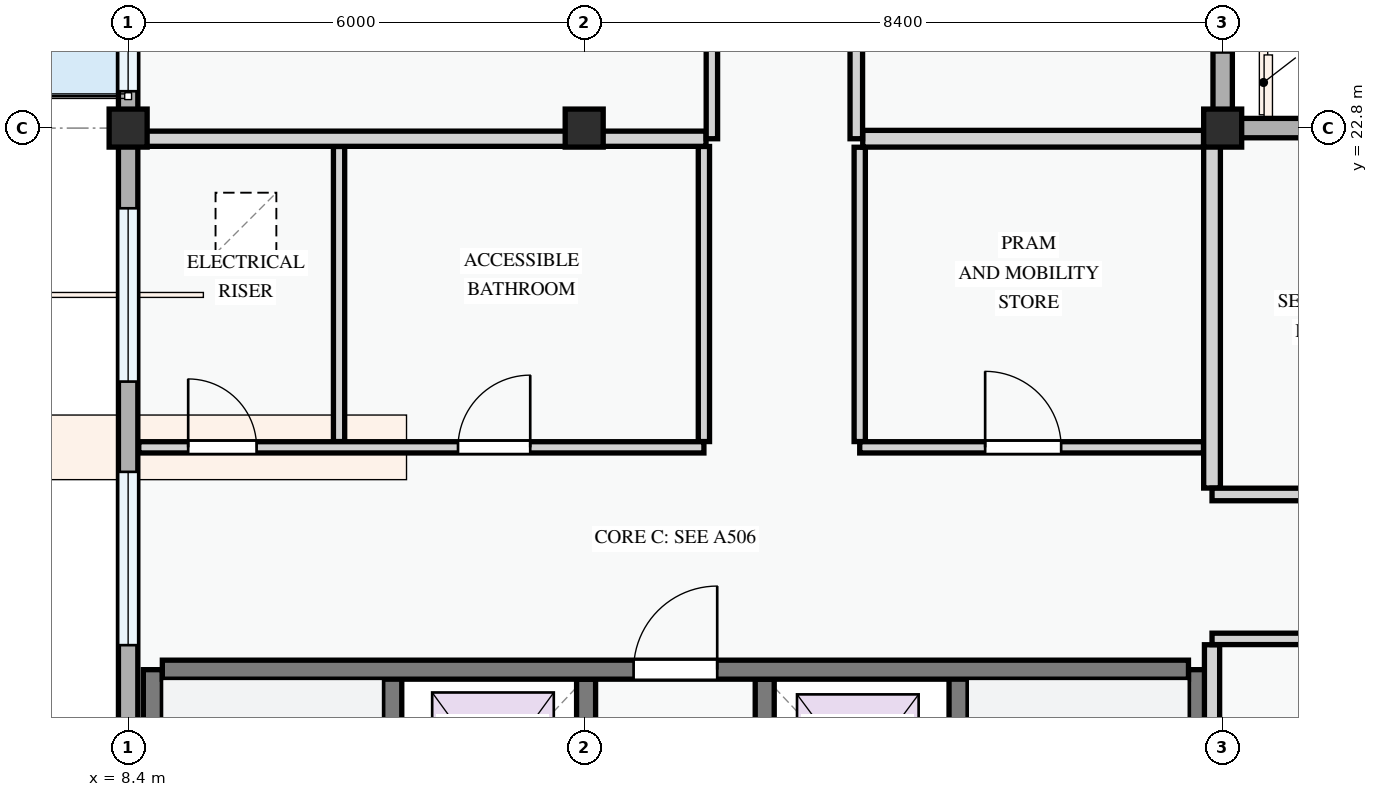
"""IFC4 building model, lengths in metres.
Left out: names, types, materials, properties, quantities, classifications, styles, units other than length and angle.
Written with IfcOpenShell. Run it as: python <this file> out.ifc"""

import sys

from ifc_helpers import new_model, si_unit, direction, frame, frame_2d, origin, origin_2d, place, context, subcontext, project, spatial, rectangle, extrude, element, fill, save


model = new_model("IFC4")
c1 = context("Model", 3, precision=1e-05, world=origin(), true_north=direction((0.0, 1.0)))
c2 = subcontext(c1, "Body", "Model", "MODEL_VIEW")
j1 = project(units=[si_unit("LENGTHUNIT", "METRE"), si_unit("PLANEANGLEUNIT", "RADIAN")], contexts=[c1])
p1 = place(None, origin())
s1 = spatial("IfcSite", under=j1, at=p1, CompositionType="ELEMENT")
p2 = place(p1, origin())
s2 = spatial("IfcBuilding", under=s1, at=p2, CompositionType="ELEMENT")
p3 = place(p2, frame((0.0, 0.0, 31.2)))
s3 = spatial("IfcBuildingStorey", under=s2, at=p3, CompositionType="ELEMENT", Elevation=31.2)
for number, where, z_axis, x_axis in (
    (1, (8.4, 22.8, 0.0), (0.0, 0.0, 1.0), (1.0, 0.0, 0.0)),
    (2, (14.4, 22.8, 0.0), (0.0, 0.0, 1.0), (1.0, 0.0, 0.0)),
    (3, (22.8, 22.8, 0.0), (0.0, 0.0, 1.0), (1.0, 0.0, 0.0)),
):
    element("IfcColumn", number, at=place(p3, frame(where, z_axis=z_axis, x_axis=x_axis)), inside=s3, PredefinedType="COLUMN", context=c2, shape_type="SweptSolid", body=[
        extrude(rectangle(XDim=0.5, YDim=0.5, at=origin_2d()), origin(), (0.0, 0.0, 1.0), 3.3),
    ])
p4 = place(p3, frame((22.8, 22.8, 0.0), z_axis=(0.0, 0.0, 1.0), x_axis=(0.0, 1.0, 0.0)))
e4 = element("IfcWall", 4, at=p4, inside=s3, PredefinedType="STANDARD", context=c2, shape_type="SweptSolid", body=[
    extrude(rectangle(XDim=6.0, YDim=0.255, at=frame_2d((3.0, 0.0))), origin(), (0.0, 0.0, 1.0), 2.575),
])
p5 = place(p4, frame((0.995, 0.0, 0.78)))
e5 = element("IfcOpeningElement", 5, at=p5, cuts=e4, PredefinedType="OPENING", context=c2, shape_type="SweptSolid", body=[
    extrude(rectangle(XDim=1.88, YDim=1.52, at=frame_2d((0.94, 0.76))), frame((0.0, 0.137, 0.0), z_axis=(0.0, -1.0, 0.0), x_axis=(1.0, 0.0, 0.0)), (0.0, 0.0, 1.0), 0.275),
])
p6 = place(p4, frame((4.17, 0.0, 0.78)))
e6 = element("IfcOpeningElement", 6, at=p6, cuts=e4, PredefinedType="OPENING", context=c2, shape_type="SweptSolid", body=[
    extrude(rectangle(XDim=1.15, YDim=1.25, at=frame_2d((0.575, 0.625))), frame((0.0, 0.137, 0.0), z_axis=(0.0, -1.0, 0.0), x_axis=(1.0, 0.0, 0.0)), (0.0, 0.0, 1.0), 0.275),
])
p7 = place(p3, frame((8.4, 28.8, 0.0), z_axis=(0.0, 0.0, 1.0), x_axis=(0.0, -1.0, 0.0)))
e7 = element("IfcWall", 7, at=p7, inside=s3, PredefinedType="STANDARD", context=c2, shape_type="SweptSolid", body=[
    extrude(rectangle(XDim=6.0, YDim=0.255, at=frame_2d((3.0, 0.0))), origin(), (0.0, 0.0, 1.0), 2.575),
])
p8 = place(p7, frame((2.49, 0.0, 0.0)))
e8 = element("IfcOpeningElement", 8, at=p8, cuts=e7, PredefinedType="OPENING", context=c2, shape_type="SweptSolid", body=[
    extrude(rectangle(XDim=1.2, YDim=2.15, at=frame_2d((0.6, 1.075))), frame((0.0, 0.137, 0.0), z_axis=(0.0, -1.0, 0.0), x_axis=(1.0, 0.0, 0.0)), (0.0, 0.0, 1.0), 0.275),
])
p9 = place(p7, frame((0.575, 0.0, 0.78)))
e9 = element("IfcOpeningElement", 9, at=p9, cuts=e7, PredefinedType="OPENING", context=c2, shape_type="SweptSolid", body=[
    extrude(rectangle(XDim=1.2, YDim=1.35, at=frame_2d((0.6, 0.675))), frame((0.0, 0.137, 0.0), z_axis=(0.0, -1.0, 0.0), x_axis=(1.0, 0.0, 0.0)), (0.0, 0.0, 1.0), 0.275),
])
p10 = place(p7, frame((4.035, 0.0, 0.78)))
e10 = element("IfcOpeningElement", 10, at=p10, cuts=e7, PredefinedType="OPENING", context=c2, shape_type="SweptSolid", body=[
    extrude(rectangle(XDim=1.48, YDim=1.52, at=frame_2d((0.74, 0.76))), frame((0.0, 0.137, 0.0), z_axis=(0.0, -1.0, 0.0), x_axis=(1.0, 0.0, 0.0)), (0.0, 0.0, 1.0), 0.275),
])
p11 = place(p3, frame((8.4, 22.8, 0.0), z_axis=(0.0, 0.0, 1.0), x_axis=(0.0, -1.0, 0.0)))
e11 = element("IfcWall", 11, at=p11, inside=s3, PredefinedType="STANDARD", context=c2, shape_type="SweptSolid", body=[
    extrude(rectangle(XDim=8.4, YDim=0.255, at=frame_2d((4.2, 0.0))), origin(), (0.0, 0.0, 1.0), 2.425),
])
p12 = place(p11, frame((1.055, 0.0, 0.78)))
e12 = element("IfcOpeningElement", 12, at=p12, cuts=e11, PredefinedType="OPENING", context=c2, shape_type="SweptSolid", body=[
    extrude(rectangle(XDim=2.28, YDim=1.46, at=frame_2d((1.14, 0.73))), frame((0.0, 0.137, 0.0), z_axis=(0.0, -1.0, 0.0), x_axis=(1.0, 0.0, 0.0)), (0.0, 0.0, 1.0), 0.275),
])
p13 = place(p11, frame((4.522, 0.0, 0.78)))
e13 = element("IfcOpeningElement", 13, at=p13, cuts=e11, PredefinedType="OPENING", context=c2, shape_type="SweptSolid", body=[
    extrude(rectangle(XDim=2.28, YDim=1.46, at=frame_2d((1.14, 0.73))), frame((0.0, 0.137, 0.0), z_axis=(0.0, -1.0, 0.0), x_axis=(1.0, 0.0, 0.0)), (0.0, 0.0, 1.0), 0.275),
])
p14 = place(p3, frame((28.8, 22.8, 0.0), z_axis=(0.0, 0.0, 1.0), x_axis=(-1.0, 0.0, 0.0)))
e14 = element("IfcWall", 14, at=p14, inside=s3, PredefinedType="STANDARD", context=c2, shape_type="SweptSolid", body=[
    extrude(rectangle(XDim=6.0, YDim=0.255, at=frame_2d((3.0, 0.0))), origin(), (0.0, 0.0, 1.0), 2.525),
])
p15 = place(p14, frame((0.68, 0.0, 0.78)))
e15 = element("IfcOpeningElement", 15, at=p15, cuts=e14, PredefinedType="OPENING", context=c2, shape_type="SweptSolid", body=[
    extrude(rectangle(XDim=1.15, YDim=1.25, at=frame_2d((0.575, 0.625))), frame((0.0, 0.137, 0.0), z_axis=(0.0, -1.0, 0.0), x_axis=(1.0, 0.0, 0.0)), (0.0, 0.0, 1.0), 0.275),
])
p16 = place(p14, frame((3.59, 0.0, 0.78)))
e16 = element("IfcOpeningElement", 16, at=p16, cuts=e14, PredefinedType="OPENING", context=c2, shape_type="SweptSolid", body=[
    extrude(rectangle(XDim=0.95, YDim=1.15, at=frame_2d((0.475, 0.575))), frame((0.0, 0.137, 0.0), z_axis=(0.0, -1.0, 0.0), x_axis=(1.0, 0.0, 0.0)), (0.0, 0.0, 1.0), 0.275),
])
p17 = place(p3, frame((11.875, 8.75, 0.0), z_axis=(0.0, 0.0, 1.0), x_axis=(0.0, 1.0, 0.0)))
e17 = element("IfcWall", 17, at=p17, inside=s3, PredefinedType="SHEAR", context=c2, shape_type="SweptSolid", body=[
    extrude(rectangle(XDim=6.925, YDim=0.25, at=frame_2d((3.462, 0.0))), origin(), (0.0, 0.0, 1.0), 3.0),
])
p18 = place(p17, frame((0.35, 0.0, 0.0)))
e18 = element("IfcOpeningElement", 18, at=p18, cuts=e17, PredefinedType="OPENING", context=c2, shape_type="SweptSolid", body=[
    extrude(rectangle(XDim=0.95, YDim=2.1, at=frame_2d((0.475, 1.05))), frame((0.0, 0.135, 0.0), z_axis=(0.0, -1.0, 0.0), x_axis=(1.0, 0.0, 0.0)), (0.0, 0.0, 1.0), 0.27),
])
p19 = place(p3, frame((8.725, 8.6, 0.0), z_axis=(0.0, 0.0, 1.0), x_axis=(0.0, 1.0, 0.0)))
e19 = element("IfcWall", 19, at=p19, inside=s3, PredefinedType="SHEAR", context=c2, shape_type="SweptSolid", body=[
    extrude(rectangle(XDim=7.075, YDim=0.25, at=frame_2d((3.538, 0.0))), origin(), (0.0, 0.0, 1.0), 3.0),
])
p20 = place(p3, frame((22.475, 8.75, 0.0), z_axis=(0.0, 0.0, 1.0), x_axis=(0.0, 1.0, 0.0)))
e20 = element("IfcWall", 20, at=p20, inside=s3, PredefinedType="SHEAR", context=c2, shape_type="SweptSolid", body=[
    extrude(rectangle(XDim=6.925, YDim=0.25, at=frame_2d((3.462, 0.0))), origin(), (0.0, 0.0, 1.0), 3.0),
])
p21 = place(p3, frame((19.325, 8.75, 0.0), z_axis=(0.0, 0.0, 1.0), x_axis=(0.0, 1.0, 0.0)))
e21 = element("IfcWall", 21, at=p21, inside=s3, PredefinedType="SHEAR", context=c2, shape_type="SweptSolid", body=[
    extrude(rectangle(XDim=6.925, YDim=0.25, at=frame_2d((3.462, 0.0))), origin(), (0.0, 0.0, 1.0), 3.0),
])
p22 = place(p21, frame((0.35, 0.0, 0.0)))
e22 = element("IfcOpeningElement", 22, at=p22, cuts=e21, PredefinedType="OPENING", context=c2, shape_type="SweptSolid", body=[
    extrude(rectangle(XDim=0.95, YDim=2.1, at=frame_2d((0.475, 1.05))), frame((0.0, 0.135, 0.0), z_axis=(0.0, -1.0, 0.0), x_axis=(1.0, 0.0, 0.0)), (0.0, 0.0, 1.0), 0.27),
])
for number, where, z_axis, x_axis in (
    (23, (14.425, 13.125, 0.0), (0.0, 0.0, 1.0), (0.0, 1.0, 0.0)),
    (24, (16.775, 13.125, 0.0), (0.0, 0.0, 1.0), (0.0, 1.0, 0.0)),
):
    element("IfcWall", number, at=place(p3, frame(where, z_axis=z_axis, x_axis=x_axis)), inside=s3, PredefinedType="SHEAR", context=c2, shape_type="SweptSolid", body=[
        extrude(rectangle(XDim=2.425, YDim=0.25, at=frame_2d((1.212, 0.0))), origin(), (0.0, 0.0, 1.0), 3.0),
    ])
p23 = place(p3, frame((8.85, 15.675, 0.0), z_axis=(0.0, 0.0, 1.0), x_axis=(1.0, 0.0, 0.0)))
e25 = element("IfcWall", 25, at=p23, inside=s3, PredefinedType="SHEAR", context=c2, shape_type="SweptSolid", body=[
    extrude(rectangle(XDim=13.5, YDim=0.25, at=frame_2d((6.75, 0.0))), origin(), (0.0, 0.0, 1.0), 3.0),
])
p24 = place(p23, frame((6.2, 0.0, 0.0)))
e26 = element("IfcOpeningElement", 26, at=p24, cuts=e25, PredefinedType="OPENING", context=c2, shape_type="SweptSolid", body=[
    extrude(rectangle(XDim=1.1, YDim=2.15, at=frame_2d((0.55, 1.075))), frame((0.0, 0.135, 0.0), z_axis=(0.0, -1.0, 0.0), x_axis=(1.0, 0.0, 0.0)), (0.0, 0.0, 1.0), 0.27),
])
for number, where, z_axis, x_axis in (
    (27, (11.175, 18.676, 0.0), (0.0, 0.0, 1.0), (0.0, 1.0, 0.0)),
    (28, (15.975, 18.676, 0.0), (0.0, 0.0, 1.0), (0.0, 1.0, 0.0)),
):
    element("IfcWall", number, at=place(p3, frame(where, z_axis=z_axis, x_axis=x_axis)), inside=s3, PredefinedType="PARTITIONING", context=c2, shape_type="SweptSolid", body=[
        extrude(rectangle(XDim=3.882, YDim=0.148, at=frame_2d((1.941, 0.0))), origin(), (0.0, 0.0, 1.0), 3.0),
    ])
p25 = place(p3, frame((18.025, 18.676, 0.0), z_axis=(0.0, 0.0, 1.0), x_axis=(0.0, 1.0, 0.0)))
e29 = element("IfcWall", 29, at=p25, inside=s3, PredefinedType="PARTITIONING", context=c2, shape_type="SweptSolid", body=[
    extrude(rectangle(XDim=3.872, YDim=0.148, at=frame_2d((1.936, 0.0))), origin(), (0.0, 0.0, 1.0), 3.0),
])
p26 = place(p3, frame((8.54, 18.6, 0.0), z_axis=(0.0, 0.0, 1.0), x_axis=(1.0, 0.0, 0.0)))
e30 = element("IfcWall", 30, at=p26, inside=s3, PredefinedType="PARTITIONING", context=c2, shape_type="SweptSolid", body=[
    extrude(rectangle(XDim=7.435, YDim=0.148, at=frame_2d((3.718, 0.0))), origin(), (0.0, 0.0, 1.0), 3.0),
])
p27 = place(p26, frame((0.65, 0.0, 0.0)))
e31 = element("IfcOpeningElement", 31, at=p27, cuts=e30, PredefinedType="OPENING", context=c2, shape_type="SweptSolid", body=[
    extrude(rectangle(XDim=0.9, YDim=2.1, at=frame_2d((0.45, 1.05))), frame((0.0, 0.084, 0.0), z_axis=(0.0, -1.0, 0.0), x_axis=(1.0, 0.0, 0.0)), (0.0, 0.0, 1.0), 0.168),
])
p28 = place(p26, frame((4.2, 0.0, 0.0)))
e32 = element("IfcOpeningElement", 32, at=p28, cuts=e30, PredefinedType="OPENING", context=c2, shape_type="SweptSolid", body=[
    extrude(rectangle(XDim=0.95, YDim=2.1, at=frame_2d((0.475, 1.05))), frame((0.0, 0.084, 0.0), z_axis=(0.0, -1.0, 0.0), x_axis=(1.0, 0.0, 0.0)), (0.0, 0.0, 1.0), 0.168),
])
p29 = place(p3, frame((18.025, 18.6, 0.0), z_axis=(0.0, 0.0, 1.0), x_axis=(1.0, 0.0, 0.0)))
e33 = element("IfcWall", 33, at=p29, inside=s3, PredefinedType="PARTITIONING", context=c2, shape_type="SweptSolid", body=[
    extrude(rectangle(XDim=4.523, YDim=0.148, at=frame_2d((2.262, 0.0))), origin(), (0.0, 0.0, 1.0), 3.0),
])
p30 = place(p29, frame((1.65, 0.0, 0.0)))
e34 = element("IfcOpeningElement", 34, at=p30, cuts=e33, PredefinedType="OPENING", context=c2, shape_type="SweptSolid", body=[
    extrude(rectangle(XDim=1.0, YDim=2.15, at=frame_2d((0.5, 1.075))), frame((0.0, 0.084, 0.0), z_axis=(0.0, -1.0, 0.0), x_axis=(1.0, 0.0, 0.0)), (0.0, 0.0, 1.0), 0.168),
])
p31 = place(p3, frame((8.53, 22.66, 0.0), z_axis=(0.0, 0.0, 1.0), x_axis=(1.0, 0.0, 0.0)))
e35 = element("IfcWall", 35, at=p31, inside=s3, PredefinedType="PARTITIONING", context=c2, shape_type="SweptSolid", body=[
    extrude(rectangle(XDim=7.473, YDim=0.2, at=frame_2d((3.737, 0.0))), origin(), (0.0, 0.0, 1.0), 2.375),
])
p32 = place(p3, frame((18.064, 22.66, 0.0), z_axis=(0.0, 0.0, 1.0), x_axis=(1.0, 0.0, 0.0)))
e36 = element("IfcWall", 36, at=p32, inside=s3, PredefinedType="PARTITIONING", context=c2, shape_type="SweptSolid", body=[
    extrude(rectangle(XDim=4.484, YDim=0.22, at=frame_2d((2.242, 0.0))), origin(), (0.0, 0.0, 1.0), 2.375),
])
p33 = place(p3, frame((16.08, 22.66, 0.0), z_axis=(0.0, 0.0, 1.0), x_axis=(0.0, 1.0, 0.0)))
e37 = element("IfcWall", 37, at=p33, inside=s3, PredefinedType="PARTITIONING", context=c2, shape_type="SweptSolid", body=[
    extrude(rectangle(XDim=20.411, YDim=0.15, at=frame_2d((10.205, 0.0))), origin(), (0.0, 0.0, 1.0), 3.0),
])
p34 = place(p33, frame((2.691, 0.0, 0.0)))
e38 = element("IfcOpeningElement", 38, at=p34, cuts=e37, PredefinedType="OPENING", context=c2, shape_type="SweptSolid", body=[
    extrude(rectangle(XDim=0.92, YDim=2.1, at=frame_2d((0.46, 1.05))), frame((0.0, 0.085, 0.0), z_axis=(0.0, -1.0, 0.0), x_axis=(1.0, 0.0, 0.0)), (0.0, 0.0, 1.0), 0.17),
])
p35 = place(p33, frame((9.91, 0.0, 0.0)))
e39 = element("IfcOpeningElement", 39, at=p35, cuts=e37, PredefinedType="OPENING", context=c2, shape_type="SweptSolid", body=[
    extrude(rectangle(XDim=0.96, YDim=2.12, at=frame_2d((0.48, 1.06))), frame((0.0, 0.085, 0.0), z_axis=(0.0, -1.0, 0.0), x_axis=(1.0, 0.0, 0.0)), (0.0, 0.0, 1.0), 0.17),
])
p36 = place(p3, frame((17.98, 22.66, 0.0), z_axis=(0.0, 0.0, 1.0), x_axis=(0.0, 1.0, 0.0)))
e40 = element("IfcWall", 40, at=p36, inside=s3, PredefinedType="PARTITIONING", context=c2, shape_type="SweptSolid", body=[
    extrude(rectangle(XDim=20.411, YDim=0.165, at=frame_2d((10.205, 0.0))), origin(), (0.0, 0.0, 1.0), 3.0),
])
p37 = place(p36, frame((2.611, 0.0, 0.0)))
e41 = element("IfcOpeningElement", 41, at=p37, cuts=e40, PredefinedType="OPENING", context=c2, shape_type="SweptSolid", body=[
    extrude(rectangle(XDim=0.92, YDim=2.1, at=frame_2d((0.46, 1.05))), frame((0.0, 0.093, 0.0), z_axis=(0.0, -1.0, 0.0), x_axis=(1.0, 0.0, 0.0)), (0.0, 0.0, 1.0), 0.185),
])
p38 = place(p36, frame((9.885, 0.0, 0.0)))
e42 = element("IfcOpeningElement", 42, at=p38, cuts=e40, PredefinedType="OPENING", context=c2, shape_type="SweptSolid", body=[
    extrude(rectangle(XDim=0.92, YDim=2.1, at=frame_2d((0.46, 1.05))), frame((0.0, 0.093, 0.0), z_axis=(0.0, -1.0, 0.0), x_axis=(1.0, 0.0, 0.0)), (0.0, 0.0, 1.0), 0.185),
])
p39 = place(p3, frame((22.66, 8.53, 0.0), z_axis=(0.0, 0.0, 1.0), x_axis=(0.0, 1.0, 0.0)))
e43 = element("IfcWall", 43, at=p39, inside=s3, PredefinedType="PARTITIONING", context=c2, shape_type="SweptSolid", body=[
    extrude(rectangle(XDim=7.473, YDim=0.2, at=frame_2d((3.737, 0.0))), origin(), (0.0, 0.0, 1.0), 2.425),
])
p40 = place(p3, frame((22.66, 18.064, 0.0), z_axis=(0.0, 0.0, 1.0), x_axis=(0.0, 1.0, 0.0)))
e44 = element("IfcWall", 44, at=p40, inside=s3, PredefinedType="PARTITIONING", context=c2, shape_type="SweptSolid", body=[
    extrude(rectangle(XDim=4.676, YDim=0.22, at=frame_2d((2.338, 0.0))), origin(), (0.0, 0.0, 1.0), 2.425),
])
p41 = place(p3, frame((22.66, 16.08, 0.0), z_axis=(0.0, 0.0, 1.0), x_axis=(1.0, 0.0, 0.0)))
e45 = element("IfcWall", 45, at=p41, inside=s3, PredefinedType="PARTITIONING", context=c2, shape_type="SweptSolid", body=[
    extrude(rectangle(XDim=20.48, YDim=0.15, at=frame_2d((10.24, 0.0))), origin(), (0.0, 0.0, 1.0), 3.0),
])
p42 = place(p41, frame((2.691, 0.0, 0.0)))
e46 = element("IfcOpeningElement", 46, at=p42, cuts=e45, PredefinedType="OPENING", context=c2, shape_type="SweptSolid", body=[
    extrude(rectangle(XDim=0.96, YDim=2.12, at=frame_2d((0.48, 1.06))), frame((0.0, 0.085, 0.0), z_axis=(0.0, -1.0, 0.0), x_axis=(1.0, 0.0, 0.0)), (0.0, 0.0, 1.0), 0.17),
])
p43 = place(p41, frame((9.91, 0.0, 0.0)))
e47 = element("IfcOpeningElement", 47, at=p43, cuts=e45, PredefinedType="OPENING", context=c2, shape_type="SweptSolid", body=[
    extrude(rectangle(XDim=0.92, YDim=2.1, at=frame_2d((0.46, 1.05))), frame((0.0, 0.085, 0.0), z_axis=(0.0, -1.0, 0.0), x_axis=(1.0, 0.0, 0.0)), (0.0, 0.0, 1.0), 0.17),
])
p44 = place(p3, frame((22.66, 17.98, 0.0), z_axis=(0.0, 0.0, 1.0), x_axis=(1.0, 0.0, 0.0)))
e48 = element("IfcWall", 48, at=p44, inside=s3, PredefinedType="PARTITIONING", context=c2, shape_type="SweptSolid", body=[
    extrude(rectangle(XDim=20.48, YDim=0.165, at=frame_2d((10.24, 0.0))), origin(), (0.0, 0.0, 1.0), 3.0),
])
p45 = place(p44, frame((2.611, 0.0, 0.0)))
e49 = element("IfcOpeningElement", 49, at=p45, cuts=e48, PredefinedType="OPENING", context=c2, shape_type="SweptSolid", body=[
    extrude(rectangle(XDim=0.92, YDim=2.1, at=frame_2d((0.46, 1.05))), frame((0.0, 0.093, 0.0), z_axis=(0.0, -1.0, 0.0), x_axis=(1.0, 0.0, 0.0)), (0.0, 0.0, 1.0), 0.185),
])
p46 = place(p44, frame((9.885, 0.0, 0.0)))
e50 = element("IfcOpeningElement", 50, at=p46, cuts=e48, PredefinedType="OPENING", context=c2, shape_type="SweptSolid", body=[
    extrude(rectangle(XDim=0.92, YDim=2.1, at=frame_2d((0.46, 1.05))), frame((0.0, 0.093, 0.0), z_axis=(0.0, -1.0, 0.0), x_axis=(1.0, 0.0, 0.0)), (0.0, 0.0, 1.0), 0.185),
])
p47 = place(p5, origin())
e51 = element("IfcWindow", 51, at=p47, inside=s3, PartitioningType="DOUBLE_PANEL_VERTICAL", PredefinedType="WINDOW", context=c2, shape_type="SweptSolid", body=[
    extrude(rectangle(XDim=1.88, YDim=1.52, at=frame_2d((0.94, 0.76))), frame((0.0, 0.03, 0.0), z_axis=(0.0, -1.0, 0.0), x_axis=(1.0, 0.0, 0.0)), (0.0, 0.0, 1.0), 0.06),
])
fill(e5, e51)
p48 = place(p10, origin())
e52 = element("IfcWindow", 52, at=p48, inside=s3, PartitioningType="SINGLE_PANEL", PredefinedType="WINDOW", context=c2, shape_type="SweptSolid", body=[
    extrude(rectangle(XDim=1.48, YDim=1.52, at=frame_2d((0.74, 0.76))), frame((0.0, 0.03, 0.0), z_axis=(0.0, -1.0, 0.0), x_axis=(1.0, 0.0, 0.0)), (0.0, 0.0, 1.0), 0.06),
])
fill(e10, e52)
p49 = place(p12, origin())
e53 = element("IfcWindow", 53, at=p49, inside=s3, PartitioningType="DOUBLE_PANEL_VERTICAL", PredefinedType="WINDOW", context=c2, shape_type="SweptSolid", body=[
    extrude(rectangle(XDim=2.28, YDim=1.46, at=frame_2d((1.14, 0.73))), frame((0.0, 0.03, 0.0), z_axis=(0.0, -1.0, 0.0), x_axis=(1.0, 0.0, 0.0)), (0.0, 0.0, 1.0), 0.06),
])
fill(e12, e53)
p50 = place(p13, origin())
e54 = element("IfcWindow", 54, at=p50, inside=s3, PartitioningType="DOUBLE_PANEL_VERTICAL", PredefinedType="WINDOW", context=c2, shape_type="SweptSolid", body=[
    extrude(rectangle(XDim=2.28, YDim=1.46, at=frame_2d((1.14, 0.73))), frame((0.0, 0.03, 0.0), z_axis=(0.0, -1.0, 0.0), x_axis=(1.0, 0.0, 0.0)), (0.0, 0.0, 1.0), 0.06),
])
fill(e13, e54)
p51 = place(p24, origin())
e55 = element("IfcDoor", 55, at=p51, inside=s3, OperationType="SINGLE_SWING_RIGHT", PredefinedType="DOOR", context=c2, shape_type="SweptSolid", body=[
    extrude(rectangle(XDim=1.1, YDim=2.15, at=frame_2d((0.55, 1.075))), frame((0.0, 0.025, 0.0), z_axis=(0.0, -1.0, 0.0), x_axis=(1.0, 0.0, 0.0)), (0.0, 0.0, 1.0), 0.05),
])
fill(e26, e55)
p52 = place(p27, origin())
e56 = element("IfcDoor", 56, at=p52, inside=s3, OperationType="SINGLE_SWING_LEFT", PredefinedType="DOOR", context=c2, shape_type="SweptSolid", body=[
    extrude(rectangle(XDim=0.9, YDim=2.1, at=frame_2d((0.45, 1.05))), frame((0.0, 0.025, 0.0), z_axis=(0.0, -1.0, 0.0), x_axis=(1.0, 0.0, 0.0)), (0.0, 0.0, 1.0), 0.05),
])
fill(e31, e56)
p53 = place(p28, origin())
e57 = element("IfcDoor", 57, at=p53, inside=s3, OperationType="SINGLE_SWING_RIGHT", PredefinedType="DOOR", context=c2, shape_type="SweptSolid", body=[
    extrude(rectangle(XDim=0.95, YDim=2.1, at=frame_2d((0.475, 1.05))), frame((0.0, 0.025, 0.0), z_axis=(0.0, -1.0, 0.0), x_axis=(1.0, 0.0, 0.0)), (0.0, 0.0, 1.0), 0.05),
])
fill(e32, e57)
p54 = place(p30, origin())
e58 = element("IfcDoor", 58, at=p54, inside=s3, OperationType="SINGLE_SWING_LEFT", PredefinedType="DOOR", context=c2, shape_type="SweptSolid", body=[
    extrude(rectangle(XDim=1.0, YDim=2.15, at=frame_2d((0.5, 1.075))), frame((0.0, 0.025, 0.0), z_axis=(0.0, -1.0, 0.0), x_axis=(1.0, 0.0, 0.0)), (0.0, 0.0, 1.0), 0.05),
])
fill(e34, e58)
save(model, sys.argv[1])
